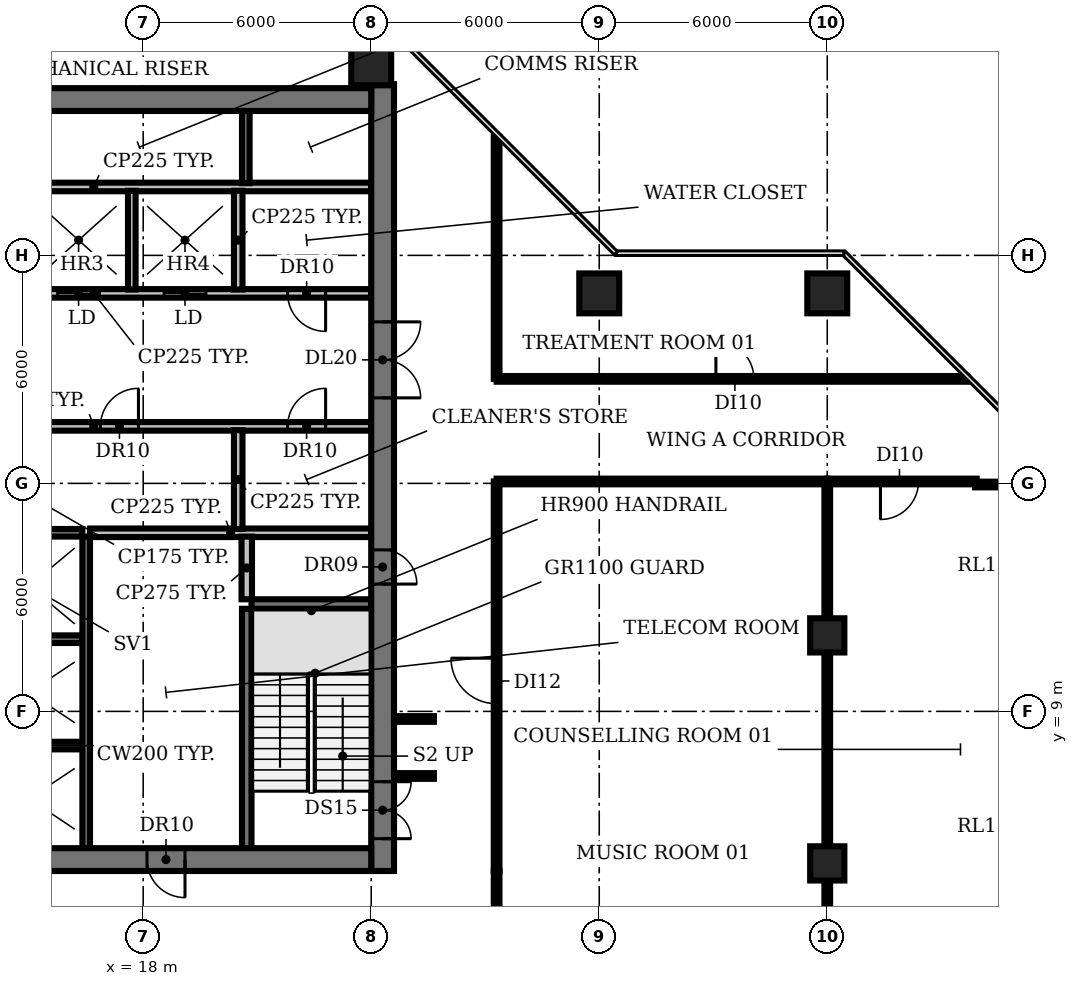
"""IFC4 building model, lengths in metres.
Left out: names, types, materials, properties, quantities, classifications, styles, units other than length and angle.
Written with IfcOpenShell. Run it as: python <this file> out.ifc"""

import sys

from ifc_helpers import new_model, si_unit, direction, frame, frame_2d, origin, origin_2d, place, context, subcontext, project, spatial, rectangle, circle, extrude, element, fill, save


model = new_model("IFC4")
c1 = context("Model", 3, precision=1e-05, world=origin(), true_north=direction((0.0, 1.0)))
c2 = subcontext(c1, "Body", "Model", "MODEL_VIEW")
j1 = project(units=[si_unit("LENGTHUNIT", "METRE"), si_unit("PLANEANGLEUNIT", "RADIAN")], contexts=[c1])
p1 = place(None, origin())
s1 = spatial("IfcSite", under=j1, at=p1, CompositionType="ELEMENT")
p2 = place(p1, origin())
s2 = spatial("IfcBuilding", under=s1, at=p2, CompositionType="ELEMENT")
p3 = place(p2, frame((0.0, 0.0, 146.6)))
s3 = spatial("IfcBuildingStorey", under=s2, at=p3, CompositionType="ELEMENT", Elevation=146.6)
for number, where, z_axis, x_axis in (
    (1, (24.0, 26.0, -0.35), (0.0, 0.0, 1.0), (1.0, 0.0, 0.0)),
    (2, (30.0, 20.0, -0.35), (0.0, 0.0, 1.0), (1.0, 0.0, 0.0)),
):
    element("IfcColumn", number, at=place(p3, frame(where, z_axis=z_axis, x_axis=x_axis)), inside=s3, PredefinedType="COLUMN", context=c2, shape_type="SweptSolid", body=[
        extrude(circle(Radius=0.525, at=origin_2d()), origin(), (0.0, 0.0, 1.0), 4.2),
    ])
for number, where, z_axis, x_axis in (
    (3, (36.0, 5.0, -0.35), (0.0, 0.0, 1.0), (1.0, 0.0, 0.0)),
    (4, (36.0, 11.0, -0.35), (0.0, 0.0, 1.0), (1.0, 0.0, 0.0)),
):
    element("IfcColumn", number, at=place(p3, frame(where, z_axis=z_axis, x_axis=x_axis)), inside=s3, PredefinedType="COLUMN", context=c2, shape_type="SweptSolid", body=[
        extrude(rectangle(XDim=0.9, YDim=0.9, at=origin_2d()), origin(), (0.0, 0.0, 1.0), 4.2),
    ])
p4 = place(p3, frame((36.0, 20.0, -0.35), z_axis=(0.0, 0.0, 1.0), x_axis=(1.0, 0.0, 0.0)))
e5 = element("IfcColumn", 5, at=p4, inside=s3, PredefinedType="COLUMN", context=c2, shape_type="SweptSolid", body=[
    extrude(circle(Radius=0.525, at=origin_2d()), origin(), (0.0, 0.0, 1.0), 4.2),
])
for number, where, z_axis, x_axis in (
    (6, (13.6, 8.1, 0.0), (0.0, 0.0, 1.0), (1.0, 0.0, 0.0)),
    (7, (13.6, 10.9, 0.0), (0.0, 0.0, 1.0), (1.0, 0.0, 0.0)),
):
    element("IfcWall", number, at=place(p3, frame(where, z_axis=z_axis, x_axis=x_axis)), inside=s3, PredefinedType="SHEAR", context=c2, shape_type="SweptSolid", body=[
        extrude(rectangle(XDim=2.8, YDim=0.2, at=frame_2d((1.4, 0.0))), origin(), (0.0, 0.0, 1.0), 3.85),
    ])
p5 = place(p3, frame((20.85, 11.825, 0.0), z_axis=(0.0, 0.0, 1.0), x_axis=(1.0, 0.0, 0.0)))
e8 = element("IfcWall", 8, at=p5, inside=s3, PredefinedType="SHEAR", context=c2, shape_type="SweptSolid", body=[
    extrude(rectangle(XDim=3.15, YDim=0.25, at=frame_2d((1.575, 0.0))), origin(), (0.0, 0.0, 1.0), 3.85),
])
p6 = place(p3, frame((13.6, 13.7, 0.0), z_axis=(0.0, 0.0, 1.0), x_axis=(1.0, 0.0, 0.0)))
e9 = element("IfcWall", 9, at=p6, inside=s3, PredefinedType="SHEAR", context=c2, shape_type="SweptSolid", body=[
    extrude(rectangle(XDim=2.8, YDim=0.2, at=frame_2d((1.4, 0.0))), origin(), (0.0, 0.0, 1.0), 3.85),
])
p7 = place(p3, frame((16.6, 13.7, 0.0), z_axis=(0.0, 0.0, 1.0), x_axis=(1.0, 0.0, 0.0)))
e10 = element("IfcWall", 10, at=p7, inside=s3, PredefinedType="PARTITIONING", context=c2, shape_type="SweptSolid", body=[
    extrude(rectangle(XDim=7.4, YDim=0.225, at=frame_2d((3.7, 0.0))), origin(), (0.0, 0.0, 1.0), 3.85),
])
p8 = place(p3, frame((9.4, 16.5, 0.0), z_axis=(0.0, 0.0, 1.0), x_axis=(1.0, 0.0, 0.0)))
e11 = element("IfcWall", 11, at=p8, inside=s3, PredefinedType="PARTITIONING", context=c2, shape_type="SweptSolid", body=[
    extrude(rectangle(XDim=14.6, YDim=0.225, at=frame_2d((7.3, 0.0))), origin(), (0.0, 0.0, 1.0), 3.85),
])
p9 = place(p8, frame((1.9, 0.0, 0.0)))
e12 = element("IfcOpeningElement", 12, at=p9, cuts=e11, PredefinedType="OPENING", context=c2, shape_type="SweptSolid", body=[
    extrude(rectangle(XDim=1.0, YDim=2.1, at=frame_2d((0.5, 1.05))), frame((0.0, 0.123, 0.0), z_axis=(0.0, -1.0, 0.0), x_axis=(1.0, 0.0, 0.0)), (0.0, 0.0, 1.0), 0.245),
])
p10 = place(p8, frame((7.475, 0.0, 0.0)))
e13 = element("IfcOpeningElement", 13, at=p10, cuts=e11, PredefinedType="OPENING", context=c2, shape_type="SweptSolid", body=[
    extrude(rectangle(XDim=1.0, YDim=2.1, at=frame_2d((0.5, 1.05))), frame((0.0, 0.123, 0.0), z_axis=(0.0, -1.0, 0.0), x_axis=(1.0, 0.0, 0.0)), (0.0, 0.0, 1.0), 0.245),
])
p11 = place(p8, frame((12.4, 0.0, 0.0)))
e14 = element("IfcOpeningElement", 14, at=p11, cuts=e11, PredefinedType="OPENING", context=c2, shape_type="SweptSolid", body=[
    extrude(rectangle(XDim=1.0, YDim=2.1, at=frame_2d((0.5, 1.05))), frame((0.0, 0.123, 0.0), z_axis=(0.0, -1.0, 0.0), x_axis=(1.0, 0.0, 0.0)), (0.0, 0.0, 1.0), 0.245),
])
p12 = place(p3, frame((24.0, 20.0, 0.0), z_axis=(0.0, 0.0, 1.0), x_axis=(-1.0, 0.0, 0.0)))
e15 = element("IfcWall", 15, at=p12, inside=s3, PredefinedType="PARTITIONING", context=c2, shape_type="SweptSolid", body=[
    extrude(rectangle(XDim=14.6, YDim=0.225, at=frame_2d((7.3, 0.0))), origin(), (0.0, 0.0, 1.0), 3.85),
])
p13 = place(p12, frame((12.75, 0.0, 0.0)))
e16 = element("IfcOpeningElement", 16, at=p13, cuts=e15, PredefinedType="OPENING", context=c2, shape_type="SweptSolid", body=[
    extrude(rectangle(XDim=1.1, YDim=2.1, at=frame_2d((0.55, 1.05))), frame((0.0, 0.123, 0.0), z_axis=(0.0, -1.0, 0.0), x_axis=(1.0, 0.0, 0.0)), (0.0, 0.0, 1.0), 0.245),
])
p14 = place(p12, frame((9.95, 0.0, 0.0)))
e17 = element("IfcOpeningElement", 17, at=p14, cuts=e15, PredefinedType="OPENING", context=c2, shape_type="SweptSolid", body=[
    extrude(rectangle(XDim=1.1, YDim=2.1, at=frame_2d((0.55, 1.05))), frame((0.0, 0.123, 0.0), z_axis=(0.0, -1.0, 0.0), x_axis=(1.0, 0.0, 0.0)), (0.0, 0.0, 1.0), 0.245),
])
p15 = place(p12, frame((7.15, 0.0, 0.0)))
e18 = element("IfcOpeningElement", 18, at=p15, cuts=e15, PredefinedType="OPENING", context=c2, shape_type="SweptSolid", body=[
    extrude(rectangle(XDim=1.1, YDim=2.1, at=frame_2d((0.55, 1.05))), frame((0.0, 0.123, 0.0), z_axis=(0.0, -1.0, 0.0), x_axis=(1.0, 0.0, 0.0)), (0.0, 0.0, 1.0), 0.245),
])
p16 = place(p12, frame((4.35, 0.0, 0.0)))
e19 = element("IfcOpeningElement", 19, at=p16, cuts=e15, PredefinedType="OPENING", context=c2, shape_type="SweptSolid", body=[
    extrude(rectangle(XDim=1.1, YDim=2.1, at=frame_2d((0.55, 1.05))), frame((0.0, 0.123, 0.0), z_axis=(0.0, -1.0, 0.0), x_axis=(1.0, 0.0, 0.0)), (0.0, 0.0, 1.0), 0.245),
])
p17 = place(p12, frame((1.2, 0.0, 0.0)))
e20 = element("IfcOpeningElement", 20, at=p17, cuts=e15, PredefinedType="OPENING", context=c2, shape_type="SweptSolid", body=[
    extrude(rectangle(XDim=1.0, YDim=2.1, at=frame_2d((0.5, 1.05))), frame((0.0, 0.123, 0.0), z_axis=(0.0, -1.0, 0.0), x_axis=(1.0, 0.0, 0.0)), (0.0, 0.0, 1.0), 0.245),
])
p18 = place(p3, frame((9.4, 22.8, 0.0), z_axis=(0.0, 0.0, 1.0), x_axis=(1.0, 0.0, 0.0)))
e21 = element("IfcWall", 21, at=p18, inside=s3, PredefinedType="PARTITIONING", context=c2, shape_type="SweptSolid", body=[
    extrude(rectangle(XDim=14.6, YDim=0.225, at=frame_2d((7.3, 0.0))), origin(), (0.0, 0.0, 1.0), 3.85),
])
p19 = place(p3, frame((16.5, 5.4, 0.0), z_axis=(0.0, 0.0, 1.0), x_axis=(0.0, 1.0, 0.0)))
e22 = element("IfcWall", 22, at=p19, inside=s3, PredefinedType="SHEAR", context=c2, shape_type="SweptSolid", body=[
    extrude(rectangle(XDim=8.2, YDim=0.2, at=frame_2d((4.1, 0.0))), origin(), (0.0, 0.0, 1.0), 3.85),
])
p20 = place(p3, frame((17.7, 20.1, 0.0), z_axis=(0.0, 0.0, 1.0), x_axis=(0.0, 1.0, 0.0)))
e23 = element("IfcWall", 23, at=p20, inside=s3, PredefinedType="SOLIDWALL", context=c2, shape_type="SweptSolid", body=[
    extrude(rectangle(XDim=2.6, YDim=0.2, at=frame_2d((1.3, 0.0))), origin(), (0.0, 0.0, 1.0), 3.85),
])
for number, where, z_axis, x_axis in (
    (24, (20.5, 13.8, 0.0), (0.0, 0.0, 1.0), (0.0, 1.0, 0.0)),
    (25, (20.5, 20.1, 0.0), (0.0, 0.0, 1.0), (0.0, 1.0, 0.0)),
):
    element("IfcWall", number, at=place(p3, frame(where, z_axis=z_axis, x_axis=x_axis)), inside=s3, PredefinedType="PARTITIONING", context=c2, shape_type="SweptSolid", body=[
        extrude(rectangle(XDim=2.6, YDim=0.225, at=frame_2d((1.3, 0.0))), origin(), (0.0, 0.0, 1.0), 3.85),
    ])
p21 = place(p3, frame((20.7, 22.9, 0.0), z_axis=(0.0, 0.0, 1.0), x_axis=(0.0, 1.0, 0.0)))
e26 = element("IfcWall", 26, at=p21, inside=s3, PredefinedType="SHEAR", context=c2, shape_type="SweptSolid", body=[
    extrude(rectangle(XDim=1.9, YDim=0.2, at=frame_2d((0.95, 0.0))), origin(), (0.0, 0.0, 1.0), 3.85),
])
p22 = place(p3, frame((20.725, 5.4, 0.0), z_axis=(0.0, 0.0, 1.0), x_axis=(0.0, 1.0, 0.0)))
e27 = element("IfcWall", 27, at=p22, inside=s3, PredefinedType="SHEAR", context=c2, shape_type="SweptSolid", body=[
    extrude(rectangle(XDim=6.3, YDim=0.25, at=frame_2d((3.15, 0.0))), origin(), (0.0, 0.0, 1.0), 3.85),
])
p23 = place(p3, frame((20.725, 11.95, 0.0), z_axis=(0.0, 0.0, 1.0), x_axis=(0.0, 1.0, 0.0)))
e28 = element("IfcWall", 28, at=p23, inside=s3, PredefinedType="PARTITIONING", context=c2, shape_type="SweptSolid", body=[
    extrude(rectangle(XDim=1.65, YDim=0.275, at=frame_2d((0.825, 0.0))), origin(), (0.0, 0.0, 1.0), 3.85),
])
p24 = place(p3, frame((24.3, 25.505, 0.0), z_axis=(0.0, 0.0, 1.0), x_axis=(0.0, -1.0, 0.0)))
e29 = element("IfcWall", 29, at=p24, inside=s3, PredefinedType="SHEAR", context=c2, shape_type="SweptSolid", body=[
    extrude(rectangle(XDim=20.705, YDim=0.6, at=frame_2d((10.353, 0.0))), origin(), (0.0, 0.0, 1.0), 3.85),
])
p25 = place(p24, frame((18.355, 0.0, 0.0)))
e30 = element("IfcOpeningElement", 30, at=p25, cuts=e29, PredefinedType="OPENING", context=c2, shape_type="SweptSolid", body=[
    extrude(rectangle(XDim=1.5, YDim=2.1, at=frame_2d((0.75, 1.05))), frame((0.0, 0.31, 0.0), z_axis=(0.0, -1.0, 0.0), x_axis=(1.0, 0.0, 0.0)), (0.0, 0.0, 1.0), 0.62),
])
p26 = place(p24, frame((12.255, 0.0, 0.0)))
e31 = element("IfcOpeningElement", 31, at=p26, cuts=e29, PredefinedType="OPENING", context=c2, shape_type="SweptSolid", body=[
    extrude(rectangle(XDim=0.9, YDim=2.1, at=frame_2d((0.45, 1.05))), frame((0.0, 0.31, 0.0), z_axis=(0.0, -1.0, 0.0), x_axis=(1.0, 0.0, 0.0)), (0.0, 0.0, 1.0), 0.62),
])
p27 = place(p24, frame((6.255, 0.0, 0.0)))
e32 = element("IfcOpeningElement", 32, at=p27, cuts=e29, PredefinedType="OPENING", context=c2, shape_type="SweptSolid", body=[
    extrude(rectangle(XDim=2.0, YDim=2.1, at=frame_2d((1.0, 1.05))), frame((0.0, 0.31, 0.0), z_axis=(0.0, -1.0, 0.0), x_axis=(1.0, 0.0, 0.0)), (0.0, 0.0, 1.0), 0.62),
])
p28 = place(p3, frame((24.0, 5.1, 0.0), z_axis=(0.0, 0.0, 1.0), x_axis=(-1.0, 0.0, 0.0)))
e33 = element("IfcWall", 33, at=p28, inside=s3, PredefinedType="SHEAR", context=c2, shape_type="SweptSolid", body=[
    extrude(rectangle(XDim=18.0, YDim=0.6, at=frame_2d((9.0, 0.0))), origin(), (0.0, 0.0, 1.0), 3.85),
])
p29 = place(p28, frame((13.0, 0.0, 0.0)))
e34 = element("IfcOpeningElement", 34, at=p29, cuts=e33, PredefinedType="OPENING", context=c2, shape_type="SweptSolid", body=[
    extrude(rectangle(XDim=1.2, YDim=2.1, at=frame_2d((0.6, 1.05))), frame((0.0, 0.31, 0.0), z_axis=(0.0, -1.0, 0.0), x_axis=(1.0, 0.0, 0.0)), (0.0, 0.0, 1.0), 0.62),
])
p30 = place(p28, frame((4.9, 0.0, 0.0)))
e35 = element("IfcOpeningElement", 35, at=p30, cuts=e33, PredefinedType="OPENING", context=c2, shape_type="SweptSolid", body=[
    extrude(rectangle(XDim=1.0, YDim=2.1, at=frame_2d((0.5, 1.05))), frame((0.0, 0.31, 0.0), z_axis=(0.0, -1.0, 0.0), x_axis=(1.0, 0.0, 0.0)), (0.0, 0.0, 1.0), 0.62),
])
p31 = place(p3, frame((6.0, 25.1, 0.0), z_axis=(0.0, 0.0, 1.0), x_axis=(1.0, 0.0, 0.0)))
e36 = element("IfcWall", 36, at=p31, inside=s3, PredefinedType="SHEAR", context=c2, shape_type="SweptSolid", body=[
    extrude(rectangle(XDim=18.0, YDim=0.6, at=frame_2d((9.0, 0.0))), origin(), (0.0, 0.0, 1.0), 3.85),
])
p32 = place(p3, frame((24.0, 25.5, 0.0), z_axis=(0.0, 0.0, 1.0), x_axis=(0.0, 1.0, 0.0)))
e37 = element("IfcWall", 37, at=p32, inside=s3, PredefinedType="PARTITIONING", context=c2, shape_type="SweptSolid", body=[
    extrude(rectangle(XDim=1.08, YDim=0.15, at=frame_2d((0.54, 0.0))), origin(), (0.0, 0.0, 1.0), 2.88),
])
for number, where, z_axis, x_axis in (
    (38, (24.6, 7.3, 0.0), (0.0, 0.0, 1.0), (1.0, 0.0, 0.0)),
    (39, (24.6, 8.8, 0.0), (0.0, 0.0, 1.0), (1.0, 0.0, 0.0)),
):
    element("IfcWall", number, at=place(p3, frame(where, z_axis=z_axis, x_axis=x_axis)), inside=s3, PredefinedType="PARTITIONING", context=c2, shape_type="SweptSolid", body=[
        extrude(rectangle(XDim=1.05, YDim=0.15, at=frame_2d((0.525, 0.0))), origin(), (0.0, 0.0, 1.0), 2.88),
    ])
p33 = place(p3, frame((27.3, 0.9, 0.0), z_axis=(0.0, 0.0, 1.0), x_axis=(0.0, 1.0, 0.0)))
e40 = element("IfcWall", 40, at=p33, inside=s3, PredefinedType="PARTITIONING", context=c2, shape_type="SweptSolid", body=[
    extrude(rectangle(XDim=3.9, YDim=0.15, at=frame_2d((1.95, 0.0))), origin(), (0.0, 0.0, 1.0), 2.88),
])
p34 = place(p3, frame((27.3, 4.8, 0.0), z_axis=(0.0, 0.0, 1.0), x_axis=(0.0, 1.0, 0.0)))
e41 = element("IfcWall", 41, at=p34, inside=s3, PredefinedType="PARTITIONING", context=c2, shape_type="SweptSolid", body=[
    extrude(rectangle(XDim=10.25, YDim=0.15, at=frame_2d((5.125, 0.0))), origin(), (0.0, 0.0, 1.0), 2.88),
])
p35 = place(p34, frame((4.4, 0.0, 0.0)))
e42 = element("IfcOpeningElement", 42, at=p35, cuts=e41, PredefinedType="OPENING", context=c2, shape_type="SweptSolid", body=[
    extrude(rectangle(XDim=1.2, YDim=2.1, at=frame_2d((0.6, 1.05))), frame((0.0, 0.085, 0.0), z_axis=(0.0, -1.0, 0.0), x_axis=(1.0, 0.0, 0.0)), (0.0, 0.0, 1.0), 0.17),
])
p36 = place(p3, frame((27.3, 15.05, 0.0), z_axis=(0.0, 0.0, 1.0), x_axis=(1.0, 0.0, 0.0)))
e43 = element("IfcWall", 43, at=p36, inside=s3, PredefinedType="PARTITIONING", context=c2, shape_type="SweptSolid", body=[
    extrude(rectangle(XDim=8.7, YDim=0.15, at=frame_2d((4.35, 0.0))), origin(), (0.0, 0.0, 1.0), 2.88),
])
p37 = place(p3, frame((27.3, 17.75, 0.0), z_axis=(0.0, 0.0, 1.0), x_axis=(0.0, 1.0, 0.0)))
e44 = element("IfcWall", 44, at=p37, inside=s3, PredefinedType="PARTITIONING", context=c2, shape_type="SweptSolid", body=[
    extrude(rectangle(XDim=6.37, YDim=0.15, at=frame_2d((3.185, 0.0))), origin(), (0.0, 0.0, 1.0), 2.88),
])
p38 = place(p3, frame((27.3, 17.75, 0.0), z_axis=(0.0, 0.0, 1.0), x_axis=(1.0, 0.0, 0.0)))
e45 = element("IfcWall", 45, at=p38, inside=s3, PredefinedType="PARTITIONING", context=c2, shape_type="SweptSolid", body=[
    extrude(rectangle(XDim=12.383, YDim=0.15, at=frame_2d((6.191, 0.0))), origin(), (0.0, 0.0, 1.0), 2.88),
])
p39 = place(p38, frame((5.77, 0.0, 0.0)))
e46 = element("IfcOpeningElement", 46, at=p39, cuts=e45, PredefinedType="OPENING", context=c2, shape_type="SweptSolid", body=[
    extrude(rectangle(XDim=1.0, YDim=2.1, at=frame_2d((0.5, 1.05))), frame((0.0, 0.085, 0.0), z_axis=(0.0, -1.0, 0.0), x_axis=(1.0, 0.0, 0.0)), (0.0, 0.0, 1.0), 0.17),
])
p40 = place(p3, frame((36.0, -4.998, 0.0), z_axis=(0.0, 0.0, 1.0), x_axis=(0.0, 1.0, 0.0)))
e47 = element("IfcWall", 47, at=p40, inside=s3, PredefinedType="PARTITIONING", context=c2, shape_type="SweptSolid", body=[
    extrude(rectangle(XDim=20.048, YDim=0.15, at=frame_2d((10.024, 0.0))), origin(), (0.0, 0.0, 1.0), 2.88),
])
p41 = place(p3, frame((39.89, 14.97, 0.0), z_axis=(0.0, 0.0, 1.0), x_axis=(1.0, 0.0, 0.0)))
e48 = element("IfcWall", 48, at=p41, inside=s3, PredefinedType="PARTITIONING", context=c2, shape_type="SweptSolid", body=[
    extrude(rectangle(XDim=2.552, YDim=0.15, at=frame_2d((1.276, 0.0))), origin(), (0.0, 0.0, 1.0), 2.88),
])
p42 = place(p3, frame((39.93, 15.05, 0.0), z_axis=(0.0, 0.0, 1.0), x_axis=(-1.0, 0.0, 0.0)))
e49 = element("IfcWall", 49, at=p42, inside=s3, PredefinedType="PARTITIONING", context=c2, shape_type="SweptSolid", body=[
    extrude(rectangle(XDim=3.93, YDim=0.15, at=frame_2d((1.965, 0.0))), origin(), (0.0, 0.0, 1.0), 2.88),
])
p43 = place(p42, frame((1.53, 0.0, 0.0)))
e50 = element("IfcOpeningElement", 50, at=p43, cuts=e49, PredefinedType="OPENING", context=c2, shape_type="SweptSolid", body=[
    extrude(rectangle(XDim=1.0, YDim=2.1, at=frame_2d((0.5, 1.05))), frame((0.0, 0.085, 0.0), z_axis=(0.0, -1.0, 0.0), x_axis=(1.0, 0.0, 0.0)), (0.0, 0.0, 1.0), 0.17),
])
p44 = place(p10, origin())
e51 = element("IfcDoor", 51, at=p44, inside=s3, OperationType="SINGLE_SWING_RIGHT", PredefinedType="DOOR", context=c2, shape_type="SweptSolid", body=[
    extrude(rectangle(XDim=1.0, YDim=2.1, at=frame_2d((0.5, 1.05))), frame((0.0, 0.025, 0.0), z_axis=(0.0, -1.0, 0.0), x_axis=(1.0, 0.0, 0.0)), (0.0, 0.0, 1.0), 0.05),
])
fill(e13, e51)
p45 = place(p11, origin())
e52 = element("IfcDoor", 52, at=p45, inside=s3, OperationType="SINGLE_SWING_RIGHT", PredefinedType="DOOR", context=c2, shape_type="SweptSolid", body=[
    extrude(rectangle(XDim=1.0, YDim=2.1, at=frame_2d((0.5, 1.05))), frame((0.0, 0.025, 0.0), z_axis=(0.0, -1.0, 0.0), x_axis=(1.0, 0.0, 0.0)), (0.0, 0.0, 1.0), 0.05),
])
fill(e14, e52)
p46 = place(p15, origin())
e53 = element("IfcDoor", 53, at=p46, inside=s3, OperationType="DOUBLE_DOOR_SLIDING", PredefinedType="DOOR", context=c2, shape_type="SweptSolid", body=[
    extrude(rectangle(XDim=1.1, YDim=2.1, at=frame_2d((0.55, 1.05))), frame((0.0, 0.025, 0.0), z_axis=(0.0, -1.0, 0.0), x_axis=(1.0, 0.0, 0.0)), (0.0, 0.0, 1.0), 0.05),
])
fill(e18, e53)
p47 = place(p16, origin())
e54 = element("IfcDoor", 54, at=p47, inside=s3, OperationType="DOUBLE_DOOR_SLIDING", PredefinedType="DOOR", context=c2, shape_type="SweptSolid", body=[
    extrude(rectangle(XDim=1.1, YDim=2.1, at=frame_2d((0.55, 1.05))), frame((0.0, 0.025, 0.0), z_axis=(0.0, -1.0, 0.0), x_axis=(1.0, 0.0, 0.0)), (0.0, 0.0, 1.0), 0.05),
])
fill(e19, e54)
p48 = place(p17, origin())
e55 = element("IfcDoor", 55, at=p48, inside=s3, OperationType="SINGLE_SWING_LEFT", PredefinedType="DOOR", context=c2, shape_type="SweptSolid", body=[
    extrude(rectangle(XDim=1.0, YDim=2.1, at=frame_2d((0.5, 1.05))), frame((0.0, 0.025, 0.0), z_axis=(0.0, -1.0, 0.0), x_axis=(1.0, 0.0, 0.0)), (0.0, 0.0, 1.0), 0.05),
])
fill(e20, e55)
p49 = place(p25, origin())
e56 = element("IfcDoor", 56, at=p49, inside=s3, OperationType="DOUBLE_DOOR_SINGLE_SWING", PredefinedType="DOOR", context=c2, shape_type="SweptSolid", body=[
    extrude(rectangle(XDim=1.5, YDim=2.1, at=frame_2d((0.75, 1.05))), frame((0.0, 0.025, 0.0), z_axis=(0.0, -1.0, 0.0), x_axis=(1.0, 0.0, 0.0)), (0.0, 0.0, 1.0), 0.05),
])
fill(e30, e56)
p50 = place(p26, origin())
e57 = element("IfcDoor", 57, at=p50, inside=s3, OperationType="SINGLE_SWING_RIGHT", PredefinedType="DOOR", context=c2, shape_type="SweptSolid", body=[
    extrude(rectangle(XDim=0.9, YDim=2.1, at=frame_2d((0.45, 1.05))), frame((0.0, -0.24, 0.0), z_axis=(0.0, -1.0, 0.0), x_axis=(1.0, 0.0, 0.0)), (0.0, 0.0, 1.0), 0.05),
])
fill(e31, e57)
p51 = place(p27, origin())
e58 = element("IfcDoor", 58, at=p51, inside=s3, OperationType="DOUBLE_DOOR_SINGLE_SWING", PredefinedType="DOOR", context=c2, shape_type="SweptSolid", body=[
    extrude(rectangle(XDim=2.0, YDim=2.1, at=frame_2d((1.0, 1.05))), frame((0.0, 0.025, 0.0), z_axis=(0.0, -1.0, 0.0), x_axis=(1.0, 0.0, 0.0)), (0.0, 0.0, 1.0), 0.05),
])
fill(e32, e58)
p52 = place(p30, origin())
e59 = element("IfcDoor", 59, at=p52, inside=s3, OperationType="SINGLE_SWING_LEFT", PredefinedType="DOOR", context=c2, shape_type="SweptSolid", body=[
    extrude(rectangle(XDim=1.0, YDim=2.1, at=frame_2d((0.5, 1.05))), frame((0.0, -0.24, 0.0), z_axis=(0.0, -1.0, 0.0), x_axis=(1.0, 0.0, 0.0)), (0.0, 0.0, 1.0), 0.05),
])
fill(e35, e59)
p53 = place(p35, origin())
e60 = element("IfcDoor", 60, at=p53, inside=s3, OperationType="SINGLE_SWING_RIGHT", PredefinedType="DOOR", context=c2, shape_type="SweptSolid", body=[
    extrude(rectangle(XDim=1.2, YDim=2.1, at=frame_2d((0.6, 1.05))), frame((0.0, 0.025, 0.0), z_axis=(0.0, -1.0, 0.0), x_axis=(1.0, 0.0, 0.0)), (0.0, 0.0, 1.0), 0.05),
])
fill(e42, e60)
p54 = place(p39, origin())
e61 = element("IfcDoor", 61, at=p54, inside=s3, OperationType="SINGLE_SWING_LEFT", PredefinedType="DOOR", context=c2, shape_type="SweptSolid", body=[
    extrude(rectangle(XDim=1.0, YDim=2.1, at=frame_2d((0.5, 1.05))), frame((0.0, 0.025, 0.0), z_axis=(0.0, -1.0, 0.0), x_axis=(1.0, 0.0, 0.0)), (0.0, 0.0, 1.0), 0.05),
])
fill(e46, e61)
p55 = place(p43, origin())
e62 = element("IfcDoor", 62, at=p55, inside=s3, OperationType="SINGLE_SWING_RIGHT", PredefinedType="DOOR", context=c2, shape_type="SweptSolid", body=[
    extrude(rectangle(XDim=1.0, YDim=2.1, at=frame_2d((0.5, 1.05))), frame((0.0, 0.025, 0.0), z_axis=(0.0, -1.0, 0.0), x_axis=(1.0, 0.0, 0.0)), (0.0, 0.0, 1.0), 0.05),
])
fill(e50, e62)
save(model, sys.argv[1])
